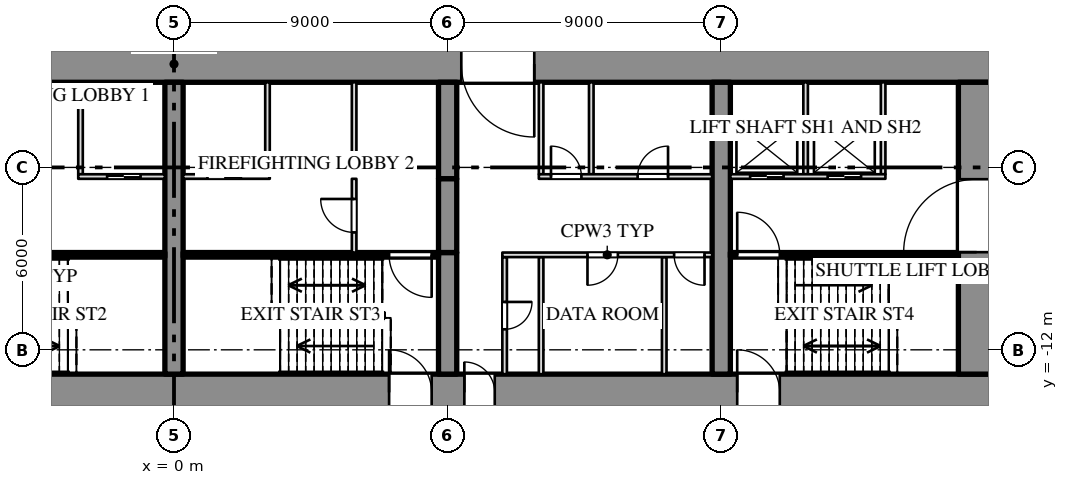
"""IFC4 building model, lengths in metres.
Left out: names, types, materials, properties, quantities, classifications, styles, units other than length and angle.
Written with IfcOpenShell. Run it as: python <this file> out.ifc"""

import sys

from ifc_helpers import new_model, si_unit, direction, frame, frame_2d, origin, place, context, subcontext, project, spatial, rectangle, extrude, element, fill, save


model = new_model("IFC4")
c1 = context("Model", 3, precision=1e-05, world=origin(), true_north=direction((0.0, 1.0)))
c2 = subcontext(c1, "Body", "Model", "MODEL_VIEW")
j1 = project(units=[si_unit("LENGTHUNIT", "METRE"), si_unit("PLANEANGLEUNIT", "RADIAN")], contexts=[c1])
p1 = place(None, origin())
s1 = spatial("IfcSite", under=j1, at=p1, CompositionType="ELEMENT")
p2 = place(p1, origin())
s2 = spatial("IfcBuilding", under=s1, at=p2, CompositionType="ELEMENT")
p3 = place(p2, origin())
s3 = spatial("IfcBuildingStorey", under=s2, at=p3, CompositionType="ELEMENT", Elevation=0.0)
p4 = place(p3, frame((-27.0, -2.6, 0.0), z_axis=(0.0, 0.0, 1.0), x_axis=(1.0, 0.0, 0.0)))
e1 = element("IfcWall", 1, at=p4, inside=s3, PredefinedType="SHEAR", context=c2, shape_type="SweptSolid", body=[
    extrude(rectangle(XDim=54.0, YDim=1.2, at=frame_2d((27.0, 0.0))), origin(), (0.0, 0.0, 1.0), 8.7),
])
p5 = place(p4, frame((15.15, 0.0, 0.0)))
e2 = element("IfcOpeningElement", 2, at=p5, cuts=e1, PredefinedType="OPENING", context=c2, shape_type="SweptSolid", body=[
    extrude(rectangle(XDim=2.4, YDim=2.1, at=frame_2d((1.2, 1.05))), frame((0.0, 0.612, 0.0), z_axis=(0.0, -1.0, 0.0), x_axis=(1.0, 0.0, 0.0)), (0.0, 0.0, 1.0), 1.224),
])
p6 = place(p4, frame((36.45, 0.0, 0.0)))
e3 = element("IfcOpeningElement", 3, at=p6, cuts=e1, PredefinedType="OPENING", context=c2, shape_type="SweptSolid", body=[
    extrude(rectangle(XDim=2.4, YDim=2.1, at=frame_2d((1.2, 1.05))), frame((0.0, 0.612, 0.0), z_axis=(0.0, -1.0, 0.0), x_axis=(1.0, 0.0, 0.0)), (0.0, 0.0, 1.0), 1.224),
])
p7 = place(p3, frame((-27.0, -13.4, 0.0), z_axis=(0.0, 0.0, 1.0), x_axis=(1.0, 0.0, 0.0)))
e4 = element("IfcWall", 4, at=p7, inside=s3, PredefinedType="SHEAR", context=c2, shape_type="SweptSolid", body=[
    extrude(rectangle(XDim=54.0, YDim=1.2, at=frame_2d((27.0, 0.0))), origin(), (0.0, 0.0, 1.0), 8.7),
])
p8 = place(p7, frame((7.075, 0.0, 0.0)))
e5 = element("IfcOpeningElement", 5, at=p8, cuts=e4, PredefinedType="OPENING", context=c2, shape_type="SweptSolid", body=[
    extrude(rectangle(XDim=1.4, YDim=2.1, at=frame_2d((0.7, 1.05))), frame((0.0, 0.612, 0.0), z_axis=(0.0, -1.0, 0.0), x_axis=(1.0, 0.0, 0.0)), (0.0, 0.0, 1.0), 1.224),
])
p9 = place(p7, frame((16.45, 0.0, 0.0)))
e6 = element("IfcOpeningElement", 6, at=p9, cuts=e4, PredefinedType="OPENING", context=c2, shape_type="SweptSolid", body=[
    extrude(rectangle(XDim=1.0, YDim=2.1, at=frame_2d((0.5, 1.05))), frame((0.0, 0.612, 0.0), z_axis=(0.0, -1.0, 0.0), x_axis=(1.0, 0.0, 0.0)), (0.0, 0.0, 1.0), 1.224),
])
p10 = place(p7, frame((18.525, 0.0, 0.0)))
e7 = element("IfcOpeningElement", 7, at=p10, cuts=e4, PredefinedType="OPENING", context=c2, shape_type="SweptSolid", body=[
    extrude(rectangle(XDim=1.4, YDim=2.1, at=frame_2d((0.7, 1.05))), frame((0.0, 0.612, 0.0), z_axis=(0.0, -1.0, 0.0), x_axis=(1.0, 0.0, 0.0)), (0.0, 0.0, 1.0), 1.224),
])
p11 = place(p7, frame((34.075, 0.0, 0.0)))
e8 = element("IfcOpeningElement", 8, at=p11, cuts=e4, PredefinedType="OPENING", context=c2, shape_type="SweptSolid", body=[
    extrude(rectangle(XDim=1.4, YDim=2.1, at=frame_2d((0.7, 1.05))), frame((0.0, 0.612, 0.0), z_axis=(0.0, -1.0, 0.0), x_axis=(1.0, 0.0, 0.0)), (0.0, 0.0, 1.0), 1.224),
])
p12 = place(p7, frame((36.55, 0.0, 0.0)))
e9 = element("IfcOpeningElement", 9, at=p12, cuts=e4, PredefinedType="OPENING", context=c2, shape_type="SweptSolid", body=[
    extrude(rectangle(XDim=1.0, YDim=2.1, at=frame_2d((0.5, 1.05))), frame((0.0, 0.612, 0.0), z_axis=(0.0, -1.0, 0.0), x_axis=(1.0, 0.0, 0.0)), (0.0, 0.0, 1.0), 1.224),
])
p13 = place(p7, frame((45.525, 0.0, 0.0)))
e10 = element("IfcOpeningElement", 10, at=p13, cuts=e4, PredefinedType="OPENING", context=c2, shape_type="SweptSolid", body=[
    extrude(rectangle(XDim=1.4, YDim=2.1, at=frame_2d((0.7, 1.05))), frame((0.0, 0.612, 0.0), z_axis=(0.0, -1.0, 0.0), x_axis=(1.0, 0.0, 0.0)), (0.0, 0.0, 1.0), 1.224),
])
p14 = place(p3, frame((26.4, -12.8, 0.0), z_axis=(0.0, 0.0, 1.0), x_axis=(0.0, 1.0, 0.0)))
e11 = element("IfcWall", 11, at=p14, inside=s3, PredefinedType="SHEAR", context=c2, shape_type="SweptSolid", body=[
    extrude(rectangle(XDim=9.6, YDim=1.2, at=frame_2d((4.8, 0.0))), origin(), (0.0, 0.0, 1.0), 8.7),
])
p15 = place(p14, frame((4.012, 0.0, 0.0)))
e12 = element("IfcOpeningElement", 12, at=p15, cuts=e11, PredefinedType="OPENING", context=c2, shape_type="SweptSolid", body=[
    extrude(rectangle(XDim=2.4, YDim=2.1, at=frame_2d((1.2, 1.05))), frame((0.0, 0.612, 0.0), z_axis=(0.0, -1.0, 0.0), x_axis=(1.0, 0.0, 0.0)), (0.0, 0.0, 1.0), 1.224),
])
p16 = place(p3, frame((0.0, -12.8, 0.0), z_axis=(0.0, 0.0, 1.0), x_axis=(0.0, 1.0, 0.0)))
e13 = element("IfcWall", 13, at=p16, inside=s3, PredefinedType="SHEAR", context=c2, shape_type="SweptSolid", body=[
    extrude(rectangle(XDim=9.6, YDim=0.6, at=frame_2d((4.8, 0.0))), origin(), (0.0, 0.0, 1.0), 8.7),
])
p17 = place(p3, frame((9.0, -12.8, 0.0), z_axis=(0.0, 0.0, 1.0), x_axis=(0.0, 1.0, 0.0)))
e14 = element("IfcWall", 14, at=p17, inside=s3, PredefinedType="SHEAR", context=c2, shape_type="SweptSolid", body=[
    extrude(rectangle(XDim=4.0, YDim=0.6, at=frame_2d((2.0, 0.0))), origin(), (0.0, 0.0, 1.0), 8.7),
])
p18 = place(p3, frame((9.0, -6.375, 0.0), z_axis=(0.0, 0.0, 1.0), x_axis=(0.0, 1.0, 0.0)))
e15 = element("IfcWall", 15, at=p18, inside=s3, PredefinedType="SHEAR", context=c2, shape_type="SweptSolid", body=[
    extrude(rectangle(XDim=3.175, YDim=0.6, at=frame_2d((1.587, 0.0))), origin(), (0.0, 0.0, 1.0), 8.7),
])
p19 = place(p3, frame((9.0, -8.8, 3.6), z_axis=(0.0, 0.0, 1.0), x_axis=(0.0, 1.0, 0.0)))
e16 = element("IfcWall", 16, at=p19, inside=s3, PredefinedType="SHEAR", context=c2, shape_type="SweptSolid", body=[
    extrude(rectangle(XDim=2.425, YDim=0.6, at=frame_2d((1.212, 0.0))), origin(), (0.0, 0.0, 1.0), 5.1),
])
p20 = place(p3, frame((18.0, -12.8, 0.0), z_axis=(0.0, 0.0, 1.0), x_axis=(0.0, 1.0, 0.0)))
e17 = element("IfcWall", 17, at=p20, inside=s3, PredefinedType="SHEAR", context=c2, shape_type="SweptSolid", body=[
    extrude(rectangle(XDim=9.6, YDim=0.6, at=frame_2d((4.8, 0.0))), origin(), (0.0, 0.0, 1.0), 8.7),
])
for number, where, z_axis, x_axis in (
    (18, (-3.075, -6.225, 0.0), (0.0, 0.0, 1.0), (0.0, 1.0, 0.0)),
    (19, (3.075, -6.225, 0.0), (0.0, 0.0, 1.0), (0.0, 1.0, 0.0)),
    (20, (5.925, -6.225, 0.0), (0.0, 0.0, 1.0), (0.0, 1.0, 0.0)),
    (21, (12.075, -6.225, 0.0), (0.0, 0.0, 1.0), (0.0, 1.0, 0.0)),
    (22, (13.725, -6.225, 0.0), (0.0, 0.0, 1.0), (0.0, 1.0, 0.0)),
    (23, (20.775, -6.225, 0.0), (0.0, 0.0, 1.0), (0.0, 1.0, 0.0)),
    (24, (23.325, -6.225, 0.0), (0.0, 0.0, 1.0), (0.0, 1.0, 0.0)),
):
    element("IfcWall", number, at=place(p3, frame(where, z_axis=z_axis, x_axis=x_axis)), inside=s3, PredefinedType="PARTITIONING", context=c2, shape_type="SweptSolid", body=[
        extrude(rectangle(XDim=3.025, YDim=0.15, at=frame_2d((1.513, 0.0))), origin(), (0.0, 0.0, 1.0), 8.7),
    ])
p21 = place(p3, frame((10.875, -12.8, 0.0), z_axis=(0.0, 0.0, 1.0), x_axis=(0.0, 1.0, 0.0)))
e25 = element("IfcWall", 25, at=p21, inside=s3, PredefinedType="PARTITIONING", context=c2, shape_type="SweptSolid", body=[
    extrude(rectangle(XDim=3.85, YDim=0.15, at=frame_2d((1.925, 0.0))), origin(), (0.0, 0.0, 1.0), 8.7),
])
p22 = place(p21, frame((1.475, 0.0, 0.0)))
e26 = element("IfcOpeningElement", 26, at=p22, cuts=e25, PredefinedType="OPENING", context=c2, shape_type="SweptSolid", body=[
    extrude(rectangle(XDim=0.9, YDim=2.1, at=frame_2d((0.45, 1.05))), frame((0.0, 0.087, 0.0), z_axis=(0.0, -1.0, 0.0), x_axis=(1.0, 0.0, 0.0)), (0.0, 0.0, 1.0), 0.174),
])
for number, where, z_axis, x_axis in (
    (27, (12.075, -12.8, 0.0), (0.0, 0.0, 1.0), (0.0, 1.0, 0.0)),
    (28, (16.125, -12.8, 0.0), (0.0, 0.0, 1.0), (0.0, 1.0, 0.0)),
):
    element("IfcWall", number, at=place(p3, frame(where, z_axis=z_axis, x_axis=x_axis)), inside=s3, PredefinedType="PARTITIONING", context=c2, shape_type="SweptSolid", body=[
        extrude(rectangle(XDim=3.85, YDim=0.15, at=frame_2d((1.925, 0.0))), origin(), (0.0, 0.0, 1.0), 8.7),
    ])
p23 = place(p3, frame((5.925, -8.8, 0.0), z_axis=(0.0, 0.0, 1.0), x_axis=(0.0, 1.0, 0.0)))
e29 = element("IfcWall", 29, at=p23, inside=s3, PredefinedType="PARTITIONING", context=c2, shape_type="SweptSolid", body=[
    extrude(rectangle(XDim=2.425, YDim=0.15, at=frame_2d((1.212, 0.0))), origin(), (0.0, 0.0, 1.0), 8.7),
])
p24 = place(p23, frame((0.662, 0.0, 0.0)))
e30 = element("IfcOpeningElement", 30, at=p24, cuts=e29, PredefinedType="OPENING", context=c2, shape_type="SweptSolid", body=[
    extrude(rectangle(XDim=1.1, YDim=2.1, at=frame_2d((0.55, 1.05))), frame((0.0, 0.087, 0.0), z_axis=(0.0, -1.0, 0.0), x_axis=(1.0, 0.0, 0.0)), (0.0, 0.0, 1.0), 0.174),
])
p25 = place(p3, frame((-3.15, -6.3, 0.0), z_axis=(0.0, 0.0, 1.0), x_axis=(1.0, 0.0, 0.0)))
e31 = element("IfcWall", 31, at=p25, inside=s3, PredefinedType="PARTITIONING", context=c2, shape_type="SweptSolid", body=[
    extrude(rectangle(XDim=2.85, YDim=0.15, at=frame_2d((1.425, 0.0))), origin(), (0.0, 0.0, 1.0), 8.7),
])
p26 = place(p25, frame((0.95, 0.0, 0.0)))
e32 = element("IfcOpeningElement", 32, at=p26, cuts=e31, PredefinedType="OPENING", context=c2, shape_type="SweptSolid", body=[
    extrude(rectangle(XDim=1.1, YDim=2.1, at=frame_2d((0.55, 1.05))), frame((0.0, 0.087, 0.0), z_axis=(0.0, -1.0, 0.0), x_axis=(1.0, 0.0, 0.0)), (0.0, 0.0, 1.0), 0.174),
])
p27 = place(p3, frame((0.3, -6.3, 0.0), z_axis=(0.0, 0.0, 1.0), x_axis=(1.0, 0.0, 0.0)))
e33 = element("IfcWall", 33, at=p27, inside=s3, PredefinedType="PARTITIONING", context=c2, shape_type="SweptSolid", body=[
    extrude(rectangle(XDim=2.85, YDim=0.15, at=frame_2d((1.425, 0.0))), origin(), (0.0, 0.0, 1.0), 8.7),
])
p28 = place(p27, frame((0.8, 0.0, 0.0)))
e34 = element("IfcOpeningElement", 34, at=p28, cuts=e33, PredefinedType="OPENING", context=c2, shape_type="SweptSolid", body=[
    extrude(rectangle(XDim=1.1, YDim=2.1, at=frame_2d((0.55, 1.05))), frame((0.0, 0.087, 0.0), z_axis=(0.0, -1.0, 0.0), x_axis=(1.0, 0.0, 0.0)), (0.0, 0.0, 1.0), 0.174),
])
p29 = place(p3, frame((12.0, -6.3, 0.0), z_axis=(0.0, 0.0, 1.0), x_axis=(1.0, 0.0, 0.0)))
e35 = element("IfcWall", 35, at=p29, inside=s3, PredefinedType="PARTITIONING", context=c2, shape_type="SweptSolid", body=[
    extrude(rectangle(XDim=5.7, YDim=0.15, at=frame_2d((2.85, 0.0))), origin(), (0.0, 0.0, 1.0), 8.7),
])
p30 = place(p29, frame((0.4, 0.0, 0.0)))
e36 = element("IfcOpeningElement", 36, at=p30, cuts=e35, PredefinedType="OPENING", context=c2, shape_type="SweptSolid", body=[
    extrude(rectangle(XDim=1.0, YDim=2.1, at=frame_2d((0.5, 1.05))), frame((0.0, 0.087, 0.0), z_axis=(0.0, -1.0, 0.0), x_axis=(1.0, 0.0, 0.0)), (0.0, 0.0, 1.0), 0.174),
])
p31 = place(p29, frame((3.25, 0.0, 0.0)))
e37 = element("IfcOpeningElement", 37, at=p31, cuts=e35, PredefinedType="OPENING", context=c2, shape_type="SweptSolid", body=[
    extrude(rectangle(XDim=1.0, YDim=2.1, at=frame_2d((0.5, 1.05))), frame((0.0, 0.087, 0.0), z_axis=(0.0, -1.0, 0.0), x_axis=(1.0, 0.0, 0.0)), (0.0, 0.0, 1.0), 0.174),
])
p32 = place(p3, frame((18.3, -6.3, 0.0), z_axis=(0.0, 0.0, 1.0), x_axis=(1.0, 0.0, 0.0)))
e38 = element("IfcWall", 38, at=p32, inside=s3, PredefinedType="PARTITIONING", context=c2, shape_type="SweptSolid", body=[
    extrude(rectangle(XDim=5.1, YDim=0.15, at=frame_2d((2.55, 0.0))), origin(), (0.0, 0.0, 1.0), 8.7),
])
p33 = place(p32, frame((0.65, 0.0, 0.0)))
e39 = element("IfcOpeningElement", 39, at=p33, cuts=e38, PredefinedType="OPENING", context=c2, shape_type="SweptSolid", body=[
    extrude(rectangle(XDim=1.1, YDim=2.1, at=frame_2d((0.55, 1.05))), frame((0.0, 0.087, 0.0), z_axis=(0.0, -1.0, 0.0), x_axis=(1.0, 0.0, 0.0)), (0.0, 0.0, 1.0), 0.174),
])
p34 = place(p32, frame((3.2, 0.0, 0.0)))
e40 = element("IfcOpeningElement", 40, at=p34, cuts=e38, PredefinedType="OPENING", context=c2, shape_type="SweptSolid", body=[
    extrude(rectangle(XDim=1.1, YDim=2.1, at=frame_2d((0.55, 1.05))), frame((0.0, 0.087, 0.0), z_axis=(0.0, -1.0, 0.0), x_axis=(1.0, 0.0, 0.0)), (0.0, 0.0, 1.0), 0.174),
])
p35 = place(p3, frame((-8.7, -8.875, 0.0), z_axis=(0.0, 0.0, 1.0), x_axis=(1.0, 0.0, 0.0)))
e41 = element("IfcWall", 41, at=p35, inside=s3, PredefinedType="SHEAR", context=c2, shape_type="SweptSolid", body=[
    extrude(rectangle(XDim=8.4, YDim=0.15, at=frame_2d((4.2, 0.0))), origin(), (0.0, 0.0, 1.0), 8.7),
])
p36 = place(p35, frame((0.225, 0.0, 0.0)))
e42 = element("IfcOpeningElement", 42, at=p36, cuts=e41, PredefinedType="OPENING", context=c2, shape_type="SweptSolid", body=[
    extrude(rectangle(XDim=1.4, YDim=2.1, at=frame_2d((0.7, 1.05))), frame((0.0, 0.087, 0.0), z_axis=(0.0, -1.0, 0.0), x_axis=(1.0, 0.0, 0.0)), (0.0, 0.0, 1.0), 0.174),
])
p37 = place(p3, frame((0.3, -8.875, 0.0), z_axis=(0.0, 0.0, 1.0), x_axis=(1.0, 0.0, 0.0)))
e43 = element("IfcWall", 43, at=p37, inside=s3, PredefinedType="SHEAR", context=c2, shape_type="SweptSolid", body=[
    extrude(rectangle(XDim=8.4, YDim=0.15, at=frame_2d((4.2, 0.0))), origin(), (0.0, 0.0, 1.0), 8.7),
])
p38 = place(p37, frame((6.775, 0.0, 0.0)))
e44 = element("IfcOpeningElement", 44, at=p38, cuts=e43, PredefinedType="OPENING", context=c2, shape_type="SweptSolid", body=[
    extrude(rectangle(XDim=1.4, YDim=2.1, at=frame_2d((0.7, 1.05))), frame((0.0, 0.087, 0.0), z_axis=(0.0, -1.0, 0.0), x_axis=(1.0, 0.0, 0.0)), (0.0, 0.0, 1.0), 0.174),
])
p39 = place(p3, frame((10.8, -8.875, 0.0), z_axis=(0.0, 0.0, 1.0), x_axis=(1.0, 0.0, 0.0)))
e45 = element("IfcWall", 45, at=p39, inside=s3, PredefinedType="PARTITIONING", context=c2, shape_type="SweptSolid", body=[
    extrude(rectangle(XDim=6.9, YDim=0.15, at=frame_2d((3.45, 0.0))), origin(), (0.0, 0.0, 1.0), 8.7),
])
p40 = place(p39, frame((2.8, 0.0, 0.0)))
e46 = element("IfcOpeningElement", 46, at=p40, cuts=e45, PredefinedType="OPENING", context=c2, shape_type="SweptSolid", body=[
    extrude(rectangle(XDim=1.0, YDim=2.1, at=frame_2d((0.5, 1.05))), frame((0.0, 0.087, 0.0), z_axis=(0.0, -1.0, 0.0), x_axis=(1.0, 0.0, 0.0)), (0.0, 0.0, 1.0), 0.174),
])
p41 = place(p39, frame((5.65, 0.0, 0.0)))
e47 = element("IfcOpeningElement", 47, at=p41, cuts=e45, PredefinedType="OPENING", context=c2, shape_type="SweptSolid", body=[
    extrude(rectangle(XDim=1.0, YDim=2.1, at=frame_2d((0.5, 1.05))), frame((0.0, 0.087, 0.0), z_axis=(0.0, -1.0, 0.0), x_axis=(1.0, 0.0, 0.0)), (0.0, 0.0, 1.0), 0.174),
])
p42 = place(p3, frame((18.3, -8.875, 0.0), z_axis=(0.0, 0.0, 1.0), x_axis=(1.0, 0.0, 0.0)))
e48 = element("IfcWall", 48, at=p42, inside=s3, PredefinedType="SHEAR", context=c2, shape_type="SweptSolid", body=[
    extrude(rectangle(XDim=7.5, YDim=0.15, at=frame_2d((3.75, 0.0))), origin(), (0.0, 0.0, 1.0), 8.7),
])
p43 = place(p42, frame((0.225, 0.0, 0.0)))
e49 = element("IfcOpeningElement", 49, at=p43, cuts=e48, PredefinedType="OPENING", context=c2, shape_type="SweptSolid", body=[
    extrude(rectangle(XDim=1.4, YDim=2.1, at=frame_2d((0.7, 1.05))), frame((0.0, 0.087, 0.0), z_axis=(0.0, -1.0, 0.0), x_axis=(1.0, 0.0, 0.0)), (0.0, 0.0, 1.0), 0.174),
])
p44 = place(p26, origin())
e50 = element("IfcDoor", 50, at=p44, inside=s3, OperationType="SLIDING_TO_RIGHT", PredefinedType="DOOR", context=c2, shape_type="SweptSolid", body=[
    extrude(rectangle(XDim=1.1, YDim=2.1, at=frame_2d((0.55, 1.05))), frame((0.0, 0.025, 0.0), z_axis=(0.0, -1.0, 0.0), x_axis=(1.0, 0.0, 0.0)), (0.0, 0.0, 1.0), 0.05),
])
fill(e32, e50)
p45 = place(p28, origin())
e51 = element("IfcDoor", 51, at=p45, inside=s3, OperationType="SLIDING_TO_LEFT", PredefinedType="DOOR", context=c2, shape_type="SweptSolid", body=[
    extrude(rectangle(XDim=1.1, YDim=2.1, at=frame_2d((0.55, 1.05))), frame((0.0, 0.025, 0.0), z_axis=(0.0, -1.0, 0.0), x_axis=(1.0, 0.0, 0.0)), (0.0, 0.0, 1.0), 0.05),
])
fill(e34, e51)
p46 = place(p24, origin())
e52 = element("IfcDoor", 52, at=p46, inside=s3, OperationType="SINGLE_SWING_RIGHT", PredefinedType="DOOR", context=c2, shape_type="SweptSolid", body=[
    extrude(rectangle(XDim=1.1, YDim=2.1, at=frame_2d((0.55, 1.05))), frame((0.0, 0.025, 0.0), z_axis=(0.0, -1.0, 0.0), x_axis=(1.0, 0.0, 0.0)), (0.0, 0.0, 1.0), 0.05),
])
fill(e30, e52)
p47 = place(p11, origin())
e53 = element("IfcDoor", 53, at=p47, inside=s3, OperationType="DOUBLE_DOOR_SINGLE_SWING", PredefinedType="DOOR", context=c2, shape_type="SweptSolid", body=[
    extrude(rectangle(XDim=1.4, YDim=2.1, at=frame_2d((0.7, 1.05))), frame((0.0, 0.025, 0.0), z_axis=(0.0, -1.0, 0.0), x_axis=(1.0, 0.0, 0.0)), (0.0, 0.0, 1.0), 0.05),
])
fill(e8, e53)
p48 = place(p38, origin())
e54 = element("IfcDoor", 54, at=p48, inside=s3, OperationType="DOUBLE_DOOR_SINGLE_SWING", PredefinedType="DOOR", context=c2, shape_type="SweptSolid", body=[
    extrude(rectangle(XDim=1.4, YDim=2.1, at=frame_2d((0.7, 1.05))), frame((0.0, 0.025, 0.0), z_axis=(0.0, -1.0, 0.0), x_axis=(1.0, 0.0, 0.0)), (0.0, 0.0, 1.0), 0.05),
])
fill(e44, e54)
p49 = place(p12, origin())
e55 = element("IfcDoor", 55, at=p49, inside=s3, OperationType="SINGLE_SWING_LEFT", PredefinedType="DOOR", context=c2, shape_type="SweptSolid", body=[
    extrude(rectangle(XDim=1.0, YDim=2.1, at=frame_2d((0.5, 1.05))), frame((0.0, 0.025, 0.0), z_axis=(0.0, -1.0, 0.0), x_axis=(1.0, 0.0, 0.0)), (0.0, 0.0, 1.0), 0.05),
])
fill(e9, e55)
p50 = place(p6, origin())
e56 = element("IfcDoor", 56, at=p50, inside=s3, OperationType="DOUBLE_DOOR_SINGLE_SWING", PredefinedType="DOOR", context=c2, shape_type="SweptSolid", body=[
    extrude(rectangle(XDim=2.4, YDim=2.1, at=frame_2d((1.2, 1.05))), frame((0.0, 0.025, 0.0), z_axis=(0.0, -1.0, 0.0), x_axis=(1.0, 0.0, 0.0)), (0.0, 0.0, 1.0), 0.05),
])
fill(e3, e56)
p51 = place(p22, origin())
e57 = element("IfcDoor", 57, at=p51, inside=s3, OperationType="SINGLE_SWING_LEFT", PredefinedType="DOOR", context=c2, shape_type="SweptSolid", body=[
    extrude(rectangle(XDim=0.9, YDim=2.1, at=frame_2d((0.45, 1.05))), frame((0.0, 0.025, 0.0), z_axis=(0.0, -1.0, 0.0), x_axis=(1.0, 0.0, 0.0)), (0.0, 0.0, 1.0), 0.05),
])
fill(e26, e57)
p52 = place(p30, origin())
e58 = element("IfcDoor", 58, at=p52, inside=s3, OperationType="SINGLE_SWING_LEFT", PredefinedType="DOOR", context=c2, shape_type="SweptSolid", body=[
    extrude(rectangle(XDim=1.0, YDim=2.1, at=frame_2d((0.5, 1.05))), frame((0.0, 0.025, 0.0), z_axis=(0.0, -1.0, 0.0), x_axis=(1.0, 0.0, 0.0)), (0.0, 0.0, 1.0), 0.05),
])
fill(e36, e58)
p53 = place(p40, origin())
e59 = element("IfcDoor", 59, at=p53, inside=s3, OperationType="SINGLE_SWING_RIGHT", PredefinedType="DOOR", context=c2, shape_type="SweptSolid", body=[
    extrude(rectangle(XDim=1.0, YDim=2.1, at=frame_2d((0.5, 1.05))), frame((0.0, 0.025, 0.0), z_axis=(0.0, -1.0, 0.0), x_axis=(1.0, 0.0, 0.0)), (0.0, 0.0, 1.0), 0.05),
])
fill(e46, e59)
p54 = place(p31, origin())
e60 = element("IfcDoor", 60, at=p54, inside=s3, OperationType="SINGLE_SWING_RIGHT", PredefinedType="DOOR", context=c2, shape_type="SweptSolid", body=[
    extrude(rectangle(XDim=1.0, YDim=2.1, at=frame_2d((0.5, 1.05))), frame((0.0, 0.025, 0.0), z_axis=(0.0, -1.0, 0.0), x_axis=(1.0, 0.0, 0.0)), (0.0, 0.0, 1.0), 0.05),
])
fill(e37, e60)
p55 = place(p41, origin())
e61 = element("IfcDoor", 61, at=p55, inside=s3, OperationType="SINGLE_SWING_LEFT", PredefinedType="DOOR", context=c2, shape_type="SweptSolid", body=[
    extrude(rectangle(XDim=1.0, YDim=2.1, at=frame_2d((0.5, 1.05))), frame((0.0, 0.025, 0.0), z_axis=(0.0, -1.0, 0.0), x_axis=(1.0, 0.0, 0.0)), (0.0, 0.0, 1.0), 0.05),
])
fill(e47, e61)
p56 = place(p13, origin())
e62 = element("IfcDoor", 62, at=p56, inside=s3, OperationType="DOUBLE_DOOR_SINGLE_SWING", PredefinedType="DOOR", context=c2, shape_type="SweptSolid", body=[
    extrude(rectangle(XDim=1.4, YDim=2.1, at=frame_2d((0.7, 1.05))), frame((0.0, 0.025, 0.0), z_axis=(0.0, -1.0, 0.0), x_axis=(1.0, 0.0, 0.0)), (0.0, 0.0, 1.0), 0.05),
])
fill(e10, e62)
p57 = place(p43, origin())
e63 = element("IfcDoor", 63, at=p57, inside=s3, OperationType="DOUBLE_DOOR_SINGLE_SWING", PredefinedType="DOOR", context=c2, shape_type="SweptSolid", body=[
    extrude(rectangle(XDim=1.4, YDim=2.1, at=frame_2d((0.7, 1.05))), frame((0.0, 0.025, 0.0), z_axis=(0.0, -1.0, 0.0), x_axis=(1.0, 0.0, 0.0)), (0.0, 0.0, 1.0), 0.05),
])
fill(e49, e63)
p58 = place(p33, origin())
e64 = element("IfcDoor", 64, at=p58, inside=s3, OperationType="SLIDING_TO_RIGHT", PredefinedType="DOOR", context=c2, shape_type="SweptSolid", body=[
    extrude(rectangle(XDim=1.1, YDim=2.1, at=frame_2d((0.55, 1.05))), frame((0.0, 0.025, 0.0), z_axis=(0.0, -1.0, 0.0), x_axis=(1.0, 0.0, 0.0)), (0.0, 0.0, 1.0), 0.05),
])
fill(e39, e64)
p59 = place(p34, origin())
e65 = element("IfcDoor", 65, at=p59, inside=s3, OperationType="SLIDING_TO_LEFT", PredefinedType="DOOR", context=c2, shape_type="SweptSolid", body=[
    extrude(rectangle(XDim=1.1, YDim=2.1, at=frame_2d((0.55, 1.05))), frame((0.0, 0.025, 0.0), z_axis=(0.0, -1.0, 0.0), x_axis=(1.0, 0.0, 0.0)), (0.0, 0.0, 1.0), 0.05),
])
fill(e40, e65)
p60 = place(p15, origin())
e66 = element("IfcDoor", 66, at=p60, inside=s3, OperationType="DOUBLE_DOOR_SINGLE_SWING", PredefinedType="DOOR", context=c2, shape_type="SweptSolid", body=[
    extrude(rectangle(XDim=2.4, YDim=2.1, at=frame_2d((1.2, 1.05))), frame((0.0, 0.025, 0.0), z_axis=(0.0, -1.0, 0.0), x_axis=(1.0, 0.0, 0.0)), (0.0, 0.0, 1.0), 0.05),
])
fill(e12, e66)
save(model, sys.argv[1])
